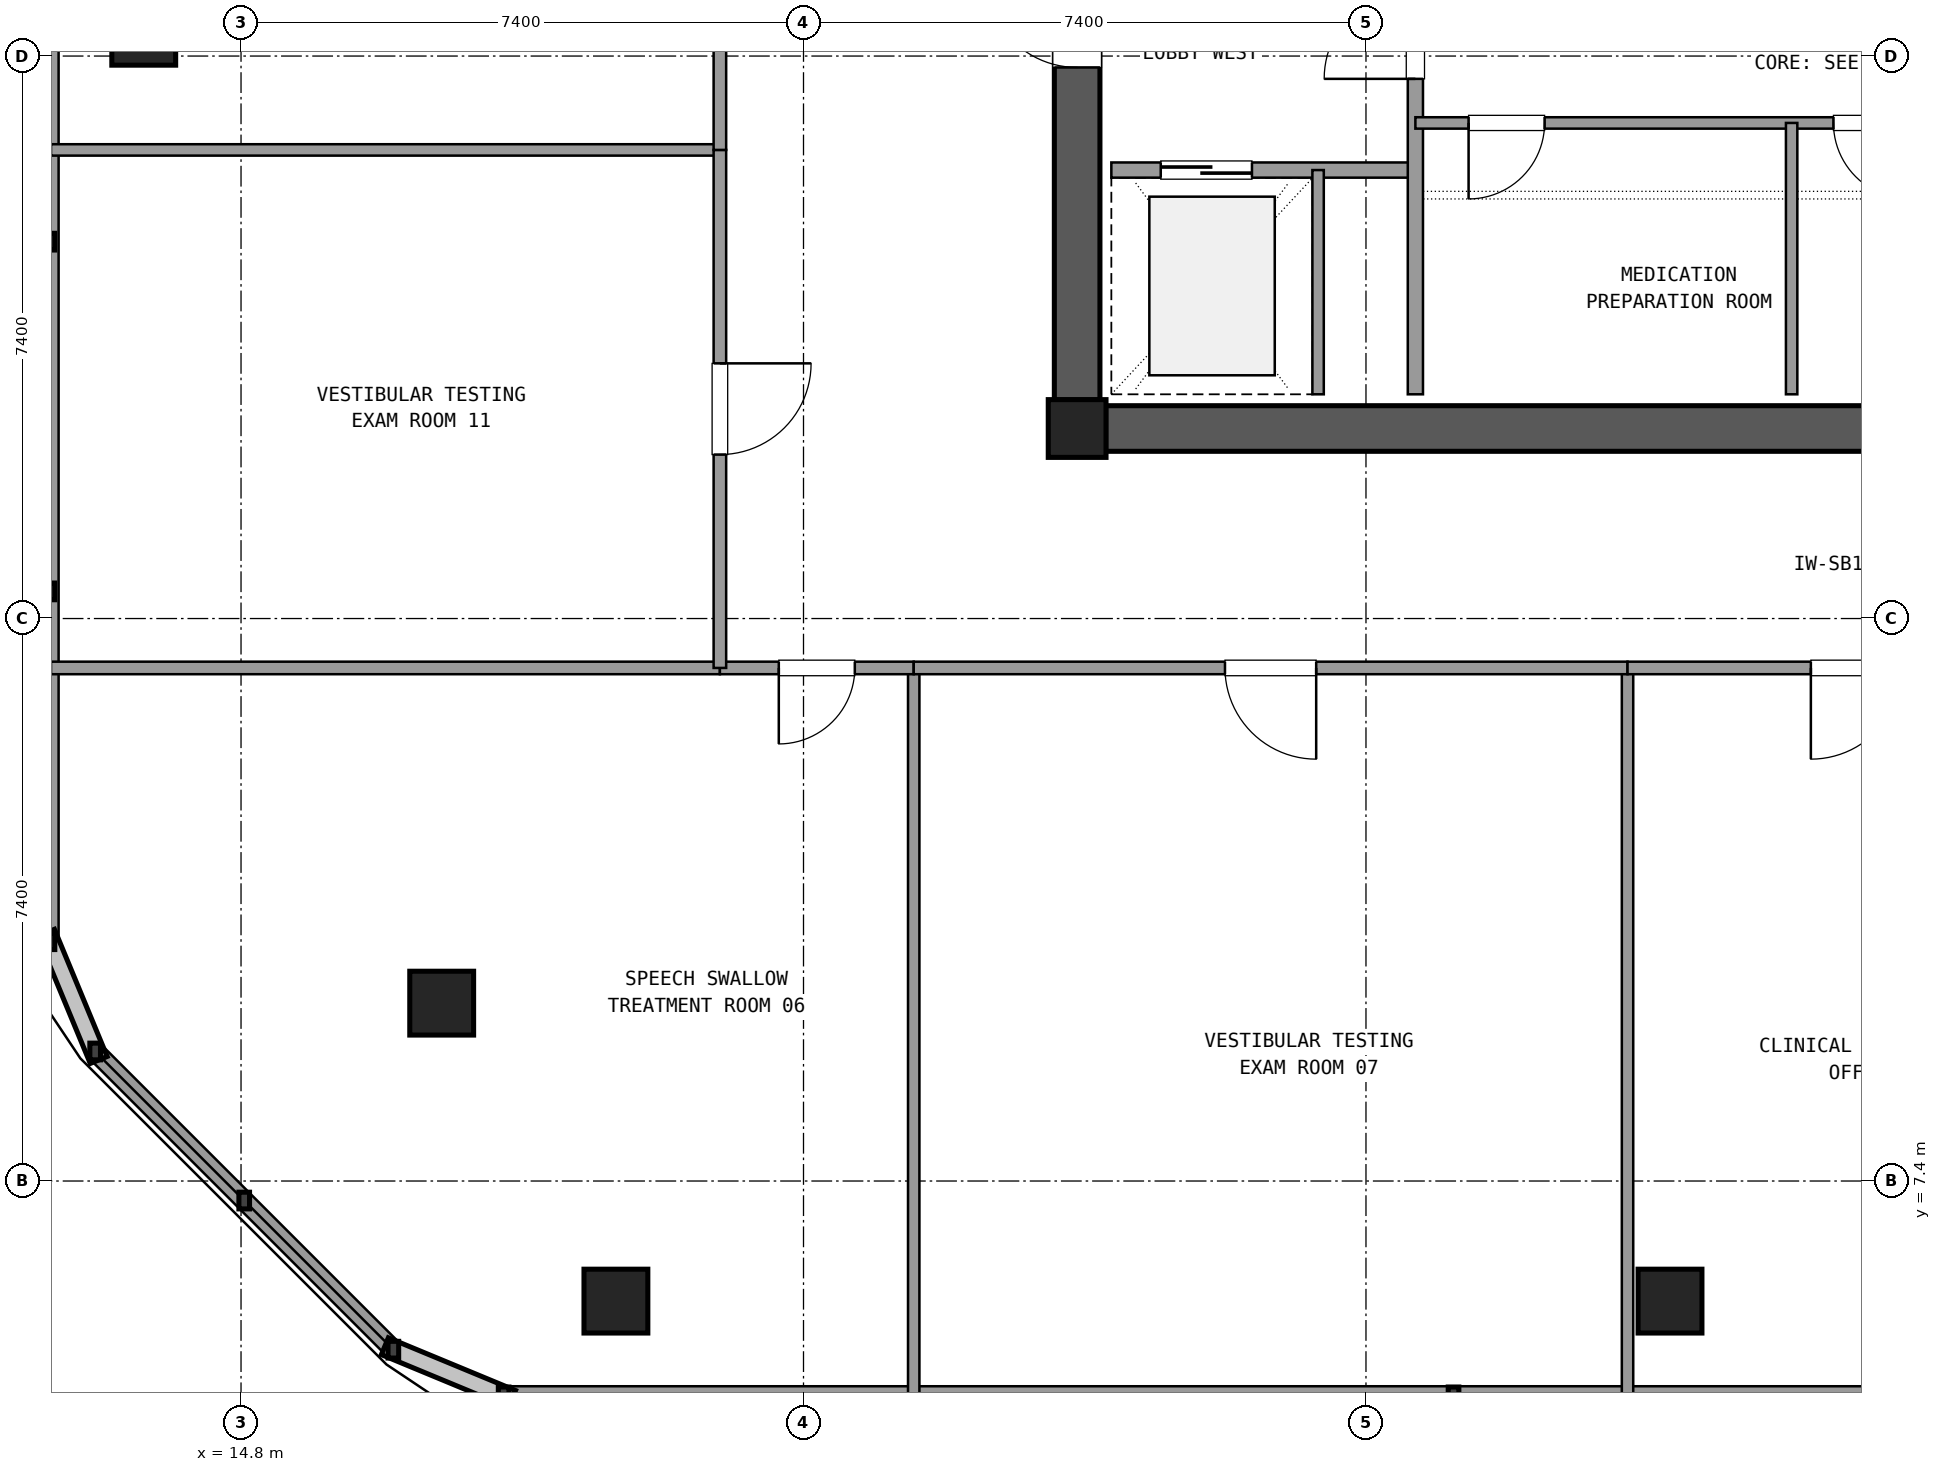
"""IFC4 building model, lengths in metres.
Left out: names, types, materials, properties, quantities, classifications, styles, units other than length and angle.
Written with IfcOpenShell. Run it as: python <this file> out.ifc"""

import sys

from ifc_helpers import new_model, si_unit, direction, frame, frame_2d, origin, origin_2d, place, context, subcontext, project, spatial, rectangle, extrude, element, fill, save


model = new_model("IFC4")
c1 = context("Model", 3, precision=1e-05, world=origin(), true_north=direction((0.0, 1.0)))
c2 = subcontext(c1, "Body", "Model", "MODEL_VIEW")
j1 = project(units=[si_unit("LENGTHUNIT", "METRE"), si_unit("PLANEANGLEUNIT", "RADIAN")], contexts=[c1])
p1 = place(None, origin())
s1 = spatial("IfcSite", under=j1, at=p1, CompositionType="ELEMENT")
p2 = place(p1, origin())
s2 = spatial("IfcBuilding", under=s1, at=p2, CompositionType="ELEMENT")
p3 = place(p2, frame((0.0, 0.0, 257.22)))
s3 = spatial("IfcBuildingStorey", under=s2, at=p3, CompositionType="ELEMENT", Elevation=257.22)
p4 = place(p3, frame((25.8, 17.3, 0.0), z_axis=(0.0, 0.0, 1.0), x_axis=(1.0, 0.0, 0.0)))
e1 = element("IfcColumn", 1, at=p4, inside=s3, PredefinedType="COLUMN", context=c2, shape_type="SweptSolid", body=[
    extrude(rectangle(XDim=0.76, YDim=0.76, at=origin_2d()), origin(), (0.0, 0.0, 1.0), 3.6),
])
p5 = place(p3, frame((26.175, 17.3, 0.0), z_axis=(0.0, 0.0, 1.0), x_axis=(1.0, 0.0, 0.0)))
e2 = element("IfcWall", 2, at=p5, inside=s3, PredefinedType="SHEAR", context=c2, shape_type="SweptSolid", body=[
    extrude(rectangle(XDim=10.45, YDim=0.6, at=frame_2d((5.225, 0.0))), origin(), (0.0, 0.0, 1.0), 3.32),
])
p6 = place(p3, frame((25.8, 25.525, 0.0), z_axis=(0.0, 0.0, 1.0), x_axis=(0.0, -1.0, 0.0)))
e3 = element("IfcWall", 3, at=p6, inside=s3, PredefinedType="SHEAR", context=c2, shape_type="SweptSolid", body=[
    extrude(rectangle(XDim=7.85, YDim=0.6, at=frame_2d((3.925, 0.0))), origin(), (0.0, 0.0, 1.0), 3.32),
])
p7 = place(p6, frame((2.275, 0.0, 0.0)))
e4 = element("IfcOpeningElement", 4, at=p7, cuts=e3, PredefinedType="OPENING", context=c2, shape_type="SweptSolid", body=[
    extrude(rectangle(XDim=1.2, YDim=2.15, at=frame_2d((0.6, 1.075))), frame((0.0, 0.31, 0.0), z_axis=(0.0, -1.0, 0.0), x_axis=(1.0, 0.0, 0.0)), (0.0, 0.0, 1.0), 0.62),
])
for number, where, z_axis, x_axis in (
    (5, (13.52, 22.5, 0.0), (0.0, 0.0, 1.0), (1.0, 0.0, 0.0)),
    (6, (17.44, 9.74, 0.0), (0.0, 0.0, 1.0), (1.0, 0.0, 0.0)),
    (7, (19.732, 5.82, 0.0), (0.0, 0.0, 1.0), (1.0, 0.0, 0.0)),
    (8, (33.6, 5.82, 0.0), (0.0, 0.0, 1.0), (1.0, 0.0, 0.0)),
):
    element("IfcColumn", number, at=place(p3, frame(where, z_axis=z_axis, x_axis=x_axis)), inside=s3, PredefinedType="COLUMN", context=c2, shape_type="SweptSolid", body=[
        extrude(rectangle(XDim=0.84, YDim=0.84, at=origin_2d()), origin(), (0.0, 0.0, 1.0), 3.6),
    ])
p8 = place(p3, frame((18.255, 4.58, 0.0), z_axis=(0.0, 0.0, 1.0), x_axis=(1.0, 0.0, 0.0)))
e9 = element("IfcWall", 9, at=p8, inside=s3, PredefinedType="SOLIDWALL", context=c2, shape_type="SweptSolid", body=[
    extrude(rectangle(XDim=37.49, YDim=0.24, at=frame_2d((18.745, 0.0))), origin(), (0.0, 0.0, 1.0), 0.85),
])
p9 = place(p3, frame((12.28, 24.36, 0.0), z_axis=(0.0, 0.0, 1.0), x_axis=(0.0, -1.0, 0.0)))
e10 = element("IfcWall", 10, at=p9, inside=s3, PredefinedType="SOLIDWALL", context=c2, shape_type="SweptSolid", body=[
    extrude(rectangle(XDim=13.805, YDim=0.24, at=frame_2d((6.903, 0.0))), origin(), (0.0, 0.0, 1.0), 0.85),
])
p10 = place(p3, frame((12.881, 9.104, 0.0), z_axis=(0.0, 0.0, 1.0), x_axis=(0.707084777957, -0.707128783731, 0.0)))
e11 = element("IfcWall", 11, at=p10, inside=s3, PredefinedType="SOLIDWALL", context=c2, shape_type="SweptSolid", body=[
    extrude(rectangle(XDim=5.548, YDim=0.24, at=frame_2d((2.774, 0.0))), origin(), (0.0, 0.0, 1.0), 0.85),
])
p11 = place(p3, frame((26.25, 20.7, 0.0), z_axis=(0.0, 0.0, 1.0), x_axis=(1.0, 0.0, 0.0)))
e12 = element("IfcWall", 12, at=p11, inside=s3, PredefinedType="SOLIDWALL", context=c2, shape_type="SweptSolid", body=[
    extrude(rectangle(XDim=4.0, YDim=0.2, at=frame_2d((2.0, 0.0))), origin(), (0.0, 0.0, 1.0), 2.61),
])
p12 = place(p11, frame((0.65, 0.0, 0.0)))
e13 = element("IfcOpeningElement", 13, at=p12, cuts=e12, PredefinedType="OPENING", context=c2, shape_type="SweptSolid", body=[
    extrude(rectangle(XDim=1.2, YDim=2.15, at=frame_2d((0.6, 1.075))), frame((0.0, 0.11, 0.0), z_axis=(0.0, -1.0, 0.0), x_axis=(1.0, 0.0, 0.0)), (0.0, 0.0, 1.0), 0.22),
])
p13 = place(p3, frame((30.25, 17.75, 0.0), z_axis=(0.0, 0.0, 1.0), x_axis=(0.0, 1.0, 0.0)))
e14 = element("IfcWall", 14, at=p13, inside=s3, PredefinedType="SOLIDWALL", context=c2, shape_type="SweptSolid", body=[
    extrude(rectangle(XDim=6.9, YDim=0.2, at=frame_2d((3.45, 0.0))), origin(), (0.0, 0.0, 1.0), 2.61),
])
p14 = place(p13, frame((4.15, 0.0, 0.0)))
e15 = element("IfcOpeningElement", 15, at=p14, cuts=e14, PredefinedType="OPENING", context=c2, shape_type="SweptSolid", body=[
    extrude(rectangle(XDim=1.2, YDim=2.15, at=frame_2d((0.6, 1.075))), frame((0.0, 0.11, 0.0), z_axis=(0.0, -1.0, 0.0), x_axis=(1.0, 0.0, 0.0)), (0.0, 0.0, 1.0), 0.22),
])
p15 = place(p3, frame((28.97, 17.75, 0.0), z_axis=(0.0, 0.0, 1.0), x_axis=(0.0, 1.0, 0.0)))
e16 = element("IfcWall", 16, at=p15, inside=s3, PredefinedType="PARTITIONING", context=c2, shape_type="SweptSolid", body=[
    extrude(rectangle(XDim=2.95, YDim=0.15, at=frame_2d((1.475, 0.0))), origin(), (0.0, 0.0, 1.0), 2.61),
])
p16 = place(p3, frame((30.25, 21.32, 0.0), z_axis=(0.0, 0.0, 1.0), x_axis=(1.0, 0.0, 0.0)))
e17 = element("IfcWall", 17, at=p16, inside=s3, PredefinedType="PARTITIONING", context=c2, shape_type="SweptSolid", body=[
    extrude(rectangle(XDim=7.0, YDim=0.15, at=frame_2d((3.5, 0.0))), origin(), (0.0, 0.0, 1.0), 2.61),
])
p17 = place(p16, frame((0.7, 0.0, 0.0)))
e18 = element("IfcOpeningElement", 18, at=p17, cuts=e17, PredefinedType="OPENING", context=c2, shape_type="SweptSolid", body=[
    extrude(rectangle(XDim=1.0, YDim=2.15, at=frame_2d((0.5, 1.075))), frame((0.0, 0.085, 0.0), z_axis=(0.0, -1.0, 0.0), x_axis=(1.0, 0.0, 0.0)), (0.0, 0.0, 1.0), 0.17),
])
p18 = place(p16, frame((5.5, 0.0, 0.0)))
e19 = element("IfcOpeningElement", 19, at=p18, cuts=e17, PredefinedType="OPENING", context=c2, shape_type="SweptSolid", body=[
    extrude(rectangle(XDim=1.0, YDim=2.15, at=frame_2d((0.5, 1.075))), frame((0.0, 0.085, 0.0), z_axis=(0.0, -1.0, 0.0), x_axis=(1.0, 0.0, 0.0)), (0.0, 0.0, 1.0), 0.17),
])
p19 = place(p3, frame((35.2, 17.75, 0.0), z_axis=(0.0, 0.0, 1.0), x_axis=(0.0, 1.0, 0.0)))
e20 = element("IfcWall", 20, at=p19, inside=s3, PredefinedType="PARTITIONING", context=c2, shape_type="SweptSolid", body=[
    extrude(rectangle(XDim=3.57, YDim=0.15, at=frame_2d((1.785, 0.0))), origin(), (0.0, 0.0, 1.0), 2.61),
])
p20 = place(p3, frame((12.3, 14.15, 0.0), z_axis=(0.0, 0.0, 1.0), x_axis=(1.0, 0.0, 0.0)))
e21 = element("IfcWall", 21, at=p20, inside=s3, PredefinedType="PARTITIONING", context=c2, shape_type="SweptSolid", body=[
    extrude(rectangle(XDim=8.8, YDim=0.165, at=frame_2d((4.4, 0.0))), origin(), (0.0, 0.0, 1.0), 2.61),
])
p21 = place(p3, frame((23.65, 14.15, 0.0), z_axis=(0.0, 0.0, 1.0), x_axis=(0.0, -1.0, 0.0)))
e22 = element("IfcWall", 22, at=p21, inside=s3, PredefinedType="PARTITIONING", context=c2, shape_type="SweptSolid", body=[
    extrude(rectangle(XDim=9.55, YDim=0.15, at=frame_2d((4.775, 0.0))), origin(), (0.0, 0.0, 1.0), 2.61),
])
p22 = place(p3, frame((21.1, 14.15, 0.0), z_axis=(0.0, 0.0, 1.0), x_axis=(1.0, 0.0, 0.0)))
e23 = element("IfcWall", 23, at=p22, inside=s3, PredefinedType="PARTITIONING", context=c2, shape_type="SweptSolid", body=[
    extrude(rectangle(XDim=2.55, YDim=0.165, at=frame_2d((1.275, 0.0))), origin(), (0.0, 0.0, 1.0), 2.61),
])
p23 = place(p22, frame((0.775, 0.0, 0.0)))
e24 = element("IfcOpeningElement", 24, at=p23, cuts=e23, PredefinedType="OPENING", context=c2, shape_type="SweptSolid", body=[
    extrude(rectangle(XDim=1.0, YDim=2.15, at=frame_2d((0.5, 1.075))), frame((0.0, 0.093, 0.0), z_axis=(0.0, -1.0, 0.0), x_axis=(1.0, 0.0, 0.0)), (0.0, 0.0, 1.0), 0.185),
])
p24 = place(p3, frame((33.041, 14.15, 0.0), z_axis=(0.0, 0.0, 1.0), x_axis=(0.0, -1.0, 0.0)))
e25 = element("IfcWall", 25, at=p24, inside=s3, PredefinedType="PARTITIONING", context=c2, shape_type="SweptSolid", body=[
    extrude(rectangle(XDim=9.55, YDim=0.15, at=frame_2d((4.775, 0.0))), origin(), (0.0, 0.0, 1.0), 2.61),
])
p25 = place(p3, frame((23.65, 14.15, 0.0), z_axis=(0.0, 0.0, 1.0), x_axis=(1.0, 0.0, 0.0)))
e26 = element("IfcWall", 26, at=p25, inside=s3, PredefinedType="PARTITIONING", context=c2, shape_type="SweptSolid", body=[
    extrude(rectangle(XDim=9.391, YDim=0.165, at=frame_2d((4.696, 0.0))), origin(), (0.0, 0.0, 1.0), 2.61),
])
p26 = place(p25, frame((4.095, 0.0, 0.0)))
e27 = element("IfcOpeningElement", 27, at=p26, cuts=e26, PredefinedType="OPENING", context=c2, shape_type="SweptSolid", body=[
    extrude(rectangle(XDim=1.2, YDim=2.15, at=frame_2d((0.6, 1.075))), frame((0.0, 0.093, 0.0), z_axis=(0.0, -1.0, 0.0), x_axis=(1.0, 0.0, 0.0)), (0.0, 0.0, 1.0), 0.185),
])
p27 = place(p3, frame((33.041, 14.15, 0.0), z_axis=(0.0, 0.0, 1.0), x_axis=(1.0, 0.0, 0.0)))
e28 = element("IfcWall", 28, at=p27, inside=s3, PredefinedType="PARTITIONING", context=c2, shape_type="SweptSolid", body=[
    extrude(rectangle(XDim=6.801, YDim=0.165, at=frame_2d((3.4, 0.0))), origin(), (0.0, 0.0, 1.0), 2.61),
])
p28 = place(p27, frame((2.412, 0.0, 0.0)))
e29 = element("IfcOpeningElement", 29, at=p28, cuts=e28, PredefinedType="OPENING", context=c2, shape_type="SweptSolid", body=[
    extrude(rectangle(XDim=1.2, YDim=2.15, at=frame_2d((0.6, 1.075))), frame((0.0, 0.093, 0.0), z_axis=(0.0, -1.0, 0.0), x_axis=(1.0, 0.0, 0.0)), (0.0, 0.0, 1.0), 0.185),
])
p29 = place(p3, frame((21.1, 20.965, 0.0), z_axis=(0.0, 0.0, 1.0), x_axis=(-1.0, 0.0, 0.0)))
e30 = element("IfcWall", 30, at=p29, inside=s3, PredefinedType="PARTITIONING", context=c2, shape_type="SweptSolid", body=[
    extrude(rectangle(XDim=8.8, YDim=0.15, at=frame_2d((4.4, 0.0))), origin(), (0.0, 0.0, 1.0), 2.61),
])
p30 = place(p3, frame((21.1, 14.15, 0.0), z_axis=(0.0, 0.0, 1.0), x_axis=(0.0, 1.0, 0.0)))
e31 = element("IfcWall", 31, at=p30, inside=s3, PredefinedType="PARTITIONING", context=c2, shape_type="SweptSolid", body=[
    extrude(rectangle(XDim=6.815, YDim=0.165, at=frame_2d((3.408, 0.0))), origin(), (0.0, 0.0, 1.0), 2.61),
])
p31 = place(p30, frame((2.807, 0.0, 0.0)))
e32 = element("IfcOpeningElement", 32, at=p31, cuts=e31, PredefinedType="OPENING", context=c2, shape_type="SweptSolid", body=[
    extrude(rectangle(XDim=1.2, YDim=2.15, at=frame_2d((0.6, 1.075))), frame((0.0, 0.093, 0.0), z_axis=(0.0, -1.0, 0.0), x_axis=(1.0, 0.0, 0.0)), (0.0, 0.0, 1.0), 0.185),
])
p32 = place(p3, frame((21.1, 20.965, 0.0), z_axis=(0.0, 0.0, 1.0), x_axis=(0.0, 1.0, 0.0)))
e33 = element("IfcWall", 33, at=p32, inside=s3, PredefinedType="PARTITIONING", context=c2, shape_type="SweptSolid", body=[
    extrude(rectangle(XDim=10.575, YDim=0.165, at=frame_2d((5.288, 0.0))), origin(), (0.0, 0.0, 1.0), 2.61),
])
p33 = place(p32, frame((4.688, 0.0, 0.0)))
e34 = element("IfcOpeningElement", 34, at=p33, cuts=e33, PredefinedType="OPENING", context=c2, shape_type="SweptSolid", body=[
    extrude(rectangle(XDim=1.2, YDim=2.15, at=frame_2d((0.6, 1.075))), frame((0.0, 0.093, 0.0), z_axis=(0.0, -1.0, 0.0), x_axis=(1.0, 0.0, 0.0)), (0.0, 0.0, 1.0), 0.185),
])
p34 = place(p12, origin())
e35 = element("IfcDoor", 35, at=p34, inside=s3, OperationType="SLIDING_TO_LEFT", PredefinedType="DOOR", context=c2, shape_type="SweptSolid", body=[
    extrude(rectangle(XDim=1.2, YDim=2.15, at=frame_2d((0.6, 1.075))), frame((0.0, 0.025, 0.0), z_axis=(0.0, -1.0, 0.0), x_axis=(1.0, 0.0, 0.0)), (0.0, 0.0, 1.0), 0.05),
])
fill(e13, e35)
p35 = place(p14, origin())
e36 = element("IfcDoor", 36, at=p35, inside=s3, OperationType="SINGLE_SWING_LEFT", PredefinedType="DOOR", context=c2, shape_type="SweptSolid", body=[
    extrude(rectangle(XDim=1.2, YDim=2.15, at=frame_2d((0.6, 1.075))), frame((0.0, 0.025, 0.0), z_axis=(0.0, -1.0, 0.0), x_axis=(1.0, 0.0, 0.0)), (0.0, 0.0, 1.0), 0.05),
])
fill(e15, e36)
p36 = place(p7, frame((1.2, 0.0, 0.0), z_axis=(0.0, 0.0, 1.0), x_axis=(-1.0, 0.0, 0.0)))
e37 = element("IfcDoor", 37, at=p36, inside=s3, OperationType="SINGLE_SWING_LEFT", PredefinedType="DOOR", context=c2, shape_type="SweptSolid", body=[
    extrude(rectangle(XDim=1.2, YDim=2.15, at=frame_2d((0.6, 1.075))), frame((0.0, 0.025, 0.0), z_axis=(0.0, -1.0, 0.0), x_axis=(1.0, 0.0, 0.0)), (0.0, 0.0, 1.0), 0.05),
])
fill(e4, e37)
p37 = place(p17, frame((1.0, 0.0, 0.0), z_axis=(0.0, 0.0, 1.0), x_axis=(-1.0, 0.0, 0.0)))
e38 = element("IfcDoor", 38, at=p37, inside=s3, OperationType="SINGLE_SWING_LEFT", PredefinedType="DOOR", context=c2, shape_type="SweptSolid", body=[
    extrude(rectangle(XDim=1.0, YDim=2.15, at=frame_2d((0.5, 1.075))), frame((0.0, 0.025, 0.0), z_axis=(0.0, -1.0, 0.0), x_axis=(1.0, 0.0, 0.0)), (0.0, 0.0, 1.0), 0.05),
])
fill(e18, e38)
p38 = place(p18, frame((1.0, 0.0, 0.0), z_axis=(0.0, 0.0, 1.0), x_axis=(-1.0, 0.0, 0.0)))
e39 = element("IfcDoor", 39, at=p38, inside=s3, OperationType="SINGLE_SWING_RIGHT", PredefinedType="DOOR", context=c2, shape_type="SweptSolid", body=[
    extrude(rectangle(XDim=1.0, YDim=2.15, at=frame_2d((0.5, 1.075))), frame((0.0, 0.025, 0.0), z_axis=(0.0, -1.0, 0.0), x_axis=(1.0, 0.0, 0.0)), (0.0, 0.0, 1.0), 0.05),
])
fill(e19, e39)
p39 = place(p23, frame((1.0, 0.0, 0.0), z_axis=(0.0, 0.0, 1.0), x_axis=(-1.0, 0.0, 0.0)))
e40 = element("IfcDoor", 40, at=p39, inside=s3, OperationType="SINGLE_SWING_LEFT", PredefinedType="DOOR", context=c2, shape_type="SweptSolid", body=[
    extrude(rectangle(XDim=1.0, YDim=2.15, at=frame_2d((0.5, 1.075))), frame((0.0, 0.025, 0.0), z_axis=(0.0, -1.0, 0.0), x_axis=(1.0, 0.0, 0.0)), (0.0, 0.0, 1.0), 0.05),
])
fill(e24, e40)
p40 = place(p26, frame((1.2, 0.0, 0.0), z_axis=(0.0, 0.0, 1.0), x_axis=(-1.0, 0.0, 0.0)))
e41 = element("IfcDoor", 41, at=p40, inside=s3, OperationType="SINGLE_SWING_RIGHT", PredefinedType="DOOR", context=c2, shape_type="SweptSolid", body=[
    extrude(rectangle(XDim=1.2, YDim=2.15, at=frame_2d((0.6, 1.075))), frame((0.0, 0.025, 0.0), z_axis=(0.0, -1.0, 0.0), x_axis=(1.0, 0.0, 0.0)), (0.0, 0.0, 1.0), 0.05),
])
fill(e27, e41)
p41 = place(p28, frame((1.2, 0.0, 0.0), z_axis=(0.0, 0.0, 1.0), x_axis=(-1.0, 0.0, 0.0)))
e42 = element("IfcDoor", 42, at=p41, inside=s3, OperationType="SINGLE_SWING_LEFT", PredefinedType="DOOR", context=c2, shape_type="SweptSolid", body=[
    extrude(rectangle(XDim=1.2, YDim=2.15, at=frame_2d((0.6, 1.075))), frame((0.0, 0.025, 0.0), z_axis=(0.0, -1.0, 0.0), x_axis=(1.0, 0.0, 0.0)), (0.0, 0.0, 1.0), 0.05),
])
fill(e29, e42)
p42 = place(p31, frame((1.2, 0.0, 0.0), z_axis=(0.0, 0.0, 1.0), x_axis=(-1.0, 0.0, 0.0)))
e43 = element("IfcDoor", 43, at=p42, inside=s3, OperationType="SINGLE_SWING_RIGHT", PredefinedType="DOOR", context=c2, shape_type="SweptSolid", body=[
    extrude(rectangle(XDim=1.2, YDim=2.15, at=frame_2d((0.6, 1.075))), frame((0.0, 0.025, 0.0), z_axis=(0.0, -1.0, 0.0), x_axis=(1.0, 0.0, 0.0)), (0.0, 0.0, 1.0), 0.05),
])
fill(e32, e43)
save(model, sys.argv[1])
